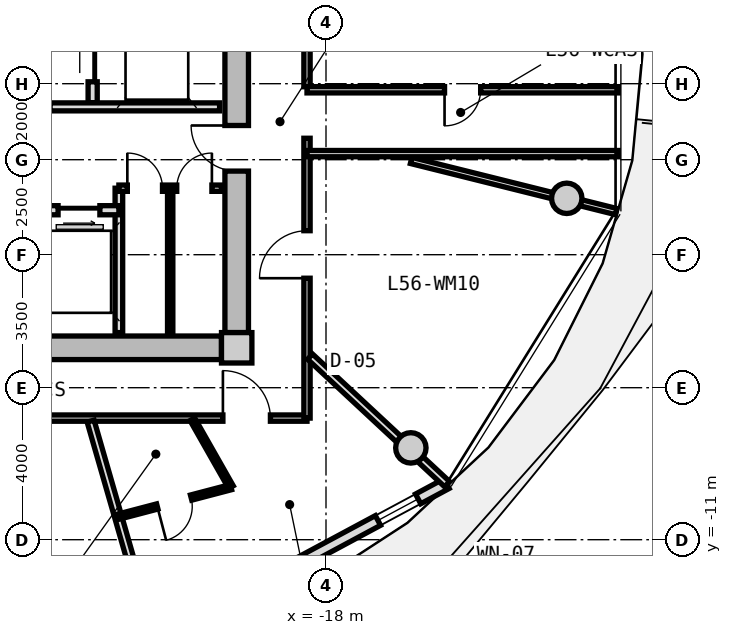
"""IFC4 building model, lengths in metres.
Left out: names, types, materials, properties, quantities, classifications, styles, units other than length and angle.
Written with IfcOpenShell. Run it as: python <this file> out.ifc"""

import sys

from ifc_helpers import new_model, si_unit, direction, frame, frame_2d, origin, origin_2d, place, context, subcontext, project, spatial, rectangle, circle, extrude, source, transform, mapped, element, fill, save


model = new_model("IFC4")
c1 = context("Model", 3, precision=1e-05, world=origin(), true_north=direction((0.0, 1.0)))
c2 = subcontext(c1, "Body", "Model", "MODEL_VIEW")
j1 = project(units=[si_unit("LENGTHUNIT", "METRE"), si_unit("PLANEANGLEUNIT", "RADIAN")], contexts=[c1])
p1 = place(None, origin())
s1 = spatial("IfcSite", under=j1, at=p1, CompositionType="ELEMENT")
p2 = place(p1, origin())
s2 = spatial("IfcBuilding", under=s1, at=p2, CompositionType="ELEMENT")
p3 = place(p2, frame((0.0, 0.0, 180.05)))
s3 = spatial("IfcBuildingStorey", under=s2, at=p3, CompositionType="ELEMENT", Elevation=180.05)
m1 = source(origin(), c2, "Body", "SweptSolid", [
    extrude(rectangle(XDim=0.8, YDim=0.8, at=origin_2d()), origin(), (0.0, 0.0, 1.0), 3.05),
])
p4 = place(p3, frame((-20.35, -5.95, 0.0), z_axis=(0.0, 0.0, 1.0), x_axis=(1.0, 0.0, 0.0)))
e1 = element("IfcColumn", 1, at=p4, inside=s3, PredefinedType="COLUMN", context=c2, shape_type="MappedRepresentation", body=[
    mapped(m1, transform((0.0, 0.0, 0.0), x_axis=(1.0, 0.0, 0.0), y_axis=(0.0, 1.0, 0.0), z_axis=(0.0, 0.0, 1.0), scale=1.0)),
])
m2 = source(origin(), c2, "Body", "SweptSolid", [
    extrude(rectangle(XDim=14.5, YDim=0.62, at=frame_2d((7.25, 0.0))), origin(), (0.0, 0.0, 1.0), 2.81),
])
p5 = place(p3, frame((-20.75, -5.95, 0.0), z_axis=(0.0, 0.0, 1.0), x_axis=(-1.0, 0.0, 0.0)))
e2 = element("IfcWall", 2, at=p5, inside=s3, PredefinedType="SHEAR", context=c2, shape_type="MappedRepresentation", body=[
    mapped(m2, transform((0.0, 0.0, 0.0), x_axis=(1.0, 0.0, 0.0), y_axis=(0.0, 1.0, 0.0), z_axis=(0.0, 0.0, 1.0), scale=1.0)),
])
m3 = source(origin(), c2, "Body", "SweptSolid", [
    extrude(rectangle(XDim=11.1, YDim=0.62, at=frame_2d((5.55, 0.0))), origin(), (0.0, 0.0, 1.0), 2.81),
])
p6 = place(p3, frame((-20.35, 5.55, 0.0), z_axis=(0.0, 0.0, 1.0), x_axis=(0.0, -1.0, 0.0)))
e3 = element("IfcWall", 3, at=p6, inside=s3, PredefinedType="SHEAR", context=c2, shape_type="MappedRepresentation", body=[
    mapped(m3, transform((0.0, 0.0, 0.0), x_axis=(1.0, 0.0, 0.0), y_axis=(0.0, 1.0, 0.0), z_axis=(0.0, 0.0, 1.0), scale=1.0)),
])
p7 = place(p6, frame((5.65, 0.0, 0.0)))
e4 = element("IfcOpeningElement", 4, at=p7, cuts=e3, PredefinedType="OPENING", context=c2, shape_type="SweptSolid", body=[
    extrude(rectangle(XDim=1.2, YDim=2.15, at=frame_2d((0.6, 1.075))), frame((0.0, 0.32, 0.0), z_axis=(0.0, -1.0, 0.0), x_axis=(1.0, 0.0, 0.0)), (0.0, 0.0, 1.0), 0.64),
])
m4 = source(origin(), c2, "Body", "SweptSolid", [
    extrude(circle(Radius=0.4, at=origin_2d()), origin(), (0.0, 0.0, 1.0), 3.05),
])
for number, where, z_axis, x_axis in (
    (5, (-15.767, -8.584, 0.0), (0.0, 0.0, 1.0), (1.0, 0.0, 0.0)),
    (6, (-11.665, -2.016, 0.0), (0.0, 0.0, 1.0), (1.0, 0.0, 0.0)),
):
    element("IfcColumn", number, at=place(p3, frame(where, z_axis=z_axis, x_axis=x_axis)), inside=s3, PredefinedType="COLUMN", context=c2, shape_type="MappedRepresentation", body=[
        mapped(m4, transform((0.0, 0.0, 0.0), x_axis=(1.0, 0.0, 0.0), y_axis=(0.0, 1.0, 0.0), z_axis=(0.0, 0.0, 1.0), scale=1.0)),
    ])
m5 = source(origin(), c2, "Body", "SweptSolid", [
    extrude(rectangle(XDim=8.742, YDim=0.29, at=frame_2d((4.371, 0.0))), origin(), (0.0, 0.0, 1.0), 2.81),
])
p8 = place(p3, frame((-14.827, -9.524, 0.0), z_axis=(0.0, 0.0, 1.0), x_axis=(-0.880998740657, -0.473118609823, 0.0)))
e7 = element("IfcWall", 7, at=p8, inside=s3, PredefinedType="SOLIDWALL", context=c2, shape_type="MappedRepresentation", body=[
    mapped(m5, transform((0.0, 0.0, 0.0), x_axis=(1.0, 0.0, 0.0), y_axis=(0.0, 1.0, 0.0), z_axis=(0.0, 0.0, 1.0), scale=1.0)),
])
p9 = place(p8, frame((6.66, 0.0, 0.0)))
e8 = element("IfcOpeningElement", 8, at=p9, cuts=e7, PredefinedType="OPENING", context=c2, shape_type="SweptSolid", body=[
    extrude(rectangle(XDim=1.15, YDim=2.25, at=frame_2d((0.575, 1.125))), frame((0.0, 0.155, 0.0), z_axis=(0.0, -1.0, 0.0), x_axis=(1.0, 0.0, 0.0)), (0.0, 0.0, 1.0), 0.31),
])
p10 = place(p8, frame((0.85, 0.0, 0.85)))
e9 = element("IfcOpeningElement", 9, at=p10, cuts=e7, PredefinedType="OPENING", context=c2, shape_type="SweptSolid", body=[
    extrude(rectangle(XDim=1.2, YDim=1.5, at=frame_2d((0.6, 0.75))), frame((0.0, 0.155, 0.0), z_axis=(0.0, -1.0, 0.0), x_axis=(1.0, 0.0, 0.0)), (0.0, 0.0, 1.0), 0.31),
])
m6 = source(origin(), c2, "Body", "SweptSolid", [
    extrude(rectangle(XDim=5.0, YDim=0.24, at=frame_2d((2.5, 0.0))), origin(), (0.0, 0.0, 1.0), 2.795),
])
p11 = place(p3, frame((-24.14, 0.5, 0.0), z_axis=(0.0, 0.0, 1.0), x_axis=(0.0, 1.0, 0.0)))
e10 = element("IfcWall", 10, at=p11, inside=s3, PredefinedType="PARTITIONING", context=c2, shape_type="MappedRepresentation", body=[
    mapped(m6, transform((0.0, 0.0, 0.0), x_axis=(1.0, 0.0, 0.0), y_axis=(0.0, 1.0, 0.0), z_axis=(0.0, 0.0, 1.0), scale=1.0)),
])
p12 = place(p11, frame((3.05, 0.0, 0.0)))
e11 = element("IfcOpeningElement", 11, at=p12, cuts=e10, PredefinedType="OPENING", context=c2, shape_type="SweptSolid", body=[
    extrude(rectangle(XDim=1.3, YDim=2.2, at=frame_2d((0.65, 1.1))), frame((0.0, 0.13, 0.0), z_axis=(0.0, -1.0, 0.0), x_axis=(1.0, 0.0, 0.0)), (0.0, 0.0, 1.0), 0.26),
])
p13 = place(p11, frame((0.55, 0.0, 0.0)))
e12 = element("IfcOpeningElement", 12, at=p13, cuts=e10, PredefinedType="OPENING", context=c2, shape_type="SweptSolid", body=[
    extrude(rectangle(XDim=1.3, YDim=2.2, at=frame_2d((0.65, 1.1))), frame((0.0, 0.13, 0.0), z_axis=(0.0, -1.0, 0.0), x_axis=(1.0, 0.0, 0.0)), (0.0, 0.0, 1.0), 0.26),
])
m7 = source(origin(), c2, "Body", "SweptSolid", [
    extrude(rectangle(XDim=6.66, YDim=0.21, at=frame_2d((3.33, 0.0))), origin(), (0.0, 0.0, 1.0), 2.795),
])
p14 = place(p3, frame((-27.46, 0.39, 0.0), z_axis=(0.0, 0.0, 1.0), x_axis=(1.0, 0.0, 0.0)))
e13 = element("IfcWall", 13, at=p14, inside=s3, PredefinedType="PARTITIONING", context=c2, shape_type="MappedRepresentation", body=[
    mapped(m7, transform((0.0, 0.0, 0.0), x_axis=(1.0, 0.0, 0.0), y_axis=(0.0, 1.0, 0.0), z_axis=(0.0, 0.0, 1.0), scale=1.0)),
])
p15 = place(p14, frame((1.0, 0.0, 0.0)))
e14 = element("IfcOpeningElement", 14, at=p15, cuts=e13, PredefinedType="OPENING", context=c2, shape_type="SweptSolid", body=[
    extrude(rectangle(XDim=1.2, YDim=2.15, at=frame_2d((0.6, 1.075))), frame((0.0, 0.115, 0.0), z_axis=(0.0, -1.0, 0.0), x_axis=(1.0, 0.0, 0.0)), (0.0, 0.0, 1.0), 0.23),
])
m8 = source(origin(), c2, "Body", "SweptSolid", [
    extrude(rectangle(XDim=3.8, YDim=0.2, at=frame_2d((1.9, 0.0))), origin(), (0.0, 0.0, 1.0), 2.795),
])
p16 = place(p3, frame((-23.45, -5.55, 0.0), z_axis=(0.0, 0.0, 1.0), x_axis=(0.0, 1.0, 0.0)))
e15 = element("IfcWall", 15, at=p16, inside=s3, PredefinedType="PARTITIONING", context=c2, shape_type="MappedRepresentation", body=[
    mapped(m8, transform((0.0, 0.0, 0.0), x_axis=(1.0, 0.0, 0.0), y_axis=(0.0, 1.0, 0.0), z_axis=(0.0, 0.0, 1.0), scale=1.0)),
])
m9 = source(origin(), c2, "Body", "SweptSolid", [
    extrude(rectangle(XDim=2.05, YDim=0.24, at=frame_2d((1.025, 0.0))), origin(), (0.0, 0.0, 1.0), 2.795),
])
p17 = place(p3, frame((-25.5, -2.33, 0.0), z_axis=(0.0, 0.0, 1.0), x_axis=(1.0, 0.0, 0.0)))
e16 = element("IfcWall", 16, at=p17, inside=s3, PredefinedType="PARTITIONING", context=c2, shape_type="MappedRepresentation", body=[
    mapped(m9, transform((0.0, 0.0, 0.0), x_axis=(1.0, 0.0, 0.0), y_axis=(0.0, 1.0, 0.0), z_axis=(0.0, 0.0, 1.0), scale=1.0)),
])
p18 = place(p17, frame((0.45, 0.0, 0.0)))
e17 = element("IfcOpeningElement", 17, at=p18, cuts=e16, PredefinedType="OPENING", context=c2, shape_type="SweptSolid", body=[
    extrude(rectangle(XDim=1.1, YDim=2.2, at=frame_2d((0.55, 1.1))), frame((0.0, 0.13, 0.0), z_axis=(0.0, -1.0, 0.0), x_axis=(1.0, 0.0, 0.0)), (0.0, 0.0, 1.0), 0.26),
])
m10 = source(origin(), c2, "Body", "SweptSolid", [
    extrude(rectangle(XDim=2.7, YDim=0.165, at=frame_2d((1.35, 0.0))), origin(), (0.0, 0.0, 1.0), 2.795),
])
p19 = place(p3, frame((-23.45, -1.75, 0.0), z_axis=(0.0, 0.0, 1.0), x_axis=(1.0, 0.0, 0.0)))
e18 = element("IfcWall", 18, at=p19, inside=s3, PredefinedType="PARTITIONING", context=c2, shape_type="MappedRepresentation", body=[
    mapped(m10, transform((0.0, 0.0, 0.0), x_axis=(1.0, 0.0, 0.0), y_axis=(0.0, 1.0, 0.0), z_axis=(0.0, 0.0, 1.0), scale=1.0)),
])
p20 = place(p19, frame((0.222, 0.0, 0.0)))
e19 = element("IfcOpeningElement", 19, at=p20, cuts=e18, PredefinedType="OPENING", context=c2, shape_type="SweptSolid", body=[
    extrude(rectangle(XDim=0.925, YDim=2.1, at=frame_2d((0.462, 1.05))), frame((0.0, 0.093, 0.0), z_axis=(0.0, -1.0, 0.0), x_axis=(1.0, 0.0, 0.0)), (0.0, 0.0, 1.0), 0.185),
])
p21 = place(p19, frame((1.522, 0.0, 0.0)))
e20 = element("IfcOpeningElement", 20, at=p21, cuts=e18, PredefinedType="OPENING", context=c2, shape_type="SweptSolid", body=[
    extrude(rectangle(XDim=0.925, YDim=2.1, at=frame_2d((0.462, 1.05))), frame((0.0, 0.093, 0.0), z_axis=(0.0, -1.0, 0.0), x_axis=(1.0, 0.0, 0.0)), (0.0, 0.0, 1.0), 0.185),
])
m11 = source(origin(), c2, "Body", "SweptSolid", [
    extrude(rectangle(XDim=3.8, YDim=0.14, at=frame_2d((1.9, 0.0))), origin(), (0.0, 0.0, 1.0), 2.795),
])
p22 = place(p3, frame((-22.1, -5.55, 0.0), z_axis=(0.0, 0.0, 1.0), x_axis=(0.0, 1.0, 0.0)))
e21 = element("IfcWall", 21, at=p22, inside=s3, PredefinedType="PARTITIONING", context=c2, shape_type="MappedRepresentation", body=[
    mapped(m11, transform((0.0, 0.0, 0.0), x_axis=(1.0, 0.0, 0.0), y_axis=(0.0, 1.0, 0.0), z_axis=(0.0, 0.0, 1.0), scale=1.0)),
])
m12 = source(origin(), c2, "Body", "SweptSolid", [
    extrude(rectangle(XDim=19.0, YDim=0.165, at=frame_2d((9.5, 0.0))), origin(), (0.0, 0.0, 1.0), 2.795),
])
p23 = place(p3, frame((-18.5, -7.8, 0.0), z_axis=(0.0, 0.0, 1.0), x_axis=(-1.0, 0.0, 0.0)))
e22 = element("IfcWall", 22, at=p23, inside=s3, PredefinedType="PARTITIONING", context=c2, shape_type="MappedRepresentation", body=[
    mapped(m12, transform((0.0, 0.0, 0.0), x_axis=(1.0, 0.0, 0.0), y_axis=(0.0, 1.0, 0.0), z_axis=(0.0, 0.0, 1.0), scale=1.0)),
])
p24 = place(p23, frame((11.598, 0.0, 0.0)))
e23 = element("IfcOpeningElement", 23, at=p24, cuts=e22, PredefinedType="OPENING", context=c2, shape_type="SweptSolid", body=[
    extrude(rectangle(XDim=1.25, YDim=2.2, at=frame_2d((0.625, 1.1))), frame((0.0, 0.093, 0.0), z_axis=(0.0, -1.0, 0.0), x_axis=(1.0, 0.0, 0.0)), (0.0, 0.0, 1.0), 0.185),
])
p25 = place(p23, frame((0.963, 0.0, 0.0)))
e24 = element("IfcOpeningElement", 24, at=p25, cuts=e22, PredefinedType="OPENING", context=c2, shape_type="SweptSolid", body=[
    extrude(rectangle(XDim=1.25, YDim=2.2, at=frame_2d((0.625, 1.1))), frame((0.0, 0.093, 0.0), z_axis=(0.0, -1.0, 0.0), x_axis=(1.0, 0.0, 0.0)), (0.0, 0.0, 1.0), 0.185),
])
m13 = source(origin(), c2, "Body", "SweptSolid", [
    extrude(rectangle(XDim=6.88, YDim=0.165, at=frame_2d((3.44, 0.0))), origin(), (0.0, 0.0, 1.0), 2.795),
])
p26 = place(p3, frame((-18.5, 7.8, 0.0), z_axis=(0.0, 0.0, 1.0), x_axis=(0.0, -1.0, 0.0)))
e25 = element("IfcWall", 25, at=p26, inside=s3, PredefinedType="PARTITIONING", context=c2, shape_type="MappedRepresentation", body=[
    mapped(m13, transform((0.0, 0.0, 0.0), x_axis=(1.0, 0.0, 0.0), y_axis=(0.0, 1.0, 0.0), z_axis=(0.0, 0.0, 1.0), scale=1.0)),
])
p27 = place(p26, frame((2.081, 0.0, 0.0)))
e26 = element("IfcOpeningElement", 26, at=p27, cuts=e25, PredefinedType="OPENING", context=c2, shape_type="SweptSolid", body=[
    extrude(rectangle(XDim=1.05, YDim=2.15, at=frame_2d((0.525, 1.075))), frame((0.0, 0.093, 0.0), z_axis=(0.0, -1.0, 0.0), x_axis=(1.0, 0.0, 0.0)), (0.0, 0.0, 1.0), 0.185),
])
m14 = source(origin(), c2, "Body", "SweptSolid", [
    extrude(rectangle(XDim=7.365, YDim=0.165, at=frame_2d((3.682, 0.0))), origin(), (0.0, 0.0, 1.0), 2.795),
])
p28 = place(p3, frame((-18.5, -0.436, 0.0), z_axis=(0.0, 0.0, 1.0), x_axis=(0.0, -1.0, 0.0)))
e27 = element("IfcWall", 27, at=p28, inside=s3, PredefinedType="PARTITIONING", context=c2, shape_type="MappedRepresentation", body=[
    mapped(m14, transform((0.0, 0.0, 0.0), x_axis=(1.0, 0.0, 0.0), y_axis=(0.0, 1.0, 0.0), z_axis=(0.0, 0.0, 1.0), scale=1.0)),
])
p29 = place(p28, frame((2.433, 0.0, 0.0)))
e28 = element("IfcOpeningElement", 28, at=p29, cuts=e27, PredefinedType="OPENING", context=c2, shape_type="SweptSolid", body=[
    extrude(rectangle(XDim=1.25, YDim=2.2, at=frame_2d((0.625, 1.1))), frame((0.0, 0.093, 0.0), z_axis=(0.0, -1.0, 0.0), x_axis=(1.0, 0.0, 0.0)), (0.0, 0.0, 1.0), 0.185),
])
m15 = source(origin(), c2, "Body", "SweptSolid", [
    extrude(rectangle(XDim=5.564, YDim=0.165, at=frame_2d((2.782, 0.0))), origin(), (0.0, 0.0, 1.0), 2.345),
])
p30 = place(p3, frame((-15.76, -1.02, 0.0), z_axis=(0.0, 0.0, 1.0), x_axis=(0.970315176167, -0.241843872984, 0.0)))
e29 = element("IfcWall", 29, at=p30, inside=s3, PredefinedType="PARTITIONING", context=c2, shape_type="MappedRepresentation", body=[
    mapped(m15, transform((0.0, 0.0, 0.0), x_axis=(1.0, 0.0, 0.0), y_axis=(0.0, 1.0, 0.0), z_axis=(0.0, 0.0, 1.0), scale=1.0)),
])
m16 = source(origin(), c2, "Body", "SweptSolid", [
    extrude(rectangle(XDim=8.189, YDim=0.165, at=frame_2d((4.094, 0.0))), origin(), (0.0, 0.0, 1.0), 2.795),
])
p31 = place(p3, frame((-18.5, 0.84, 0.0), z_axis=(0.0, 0.0, 1.0), x_axis=(1.0, 0.0, 0.0)))
e30 = element("IfcWall", 30, at=p31, inside=s3, PredefinedType="PARTITIONING", context=c2, shape_type="MappedRepresentation", body=[
    mapped(m16, transform((0.0, 0.0, 0.0), x_axis=(1.0, 0.0, 0.0), y_axis=(0.0, 1.0, 0.0), z_axis=(0.0, 0.0, 1.0), scale=1.0)),
])
p32 = place(p31, frame((3.619, 0.0, 0.0)))
e31 = element("IfcOpeningElement", 31, at=p32, cuts=e30, PredefinedType="OPENING", context=c2, shape_type="SweptSolid", body=[
    extrude(rectangle(XDim=0.95, YDim=2.1, at=frame_2d((0.475, 1.05))), frame((0.0, 0.093, 0.0), z_axis=(0.0, -1.0, 0.0), x_axis=(1.0, 0.0, 0.0)), (0.0, 0.0, 1.0), 0.185),
])
p33 = place(p3, frame((-10.311, -0.84, 0.0), z_axis=(0.0, 0.0, 1.0), x_axis=(-1.0, 0.0, 0.0)))
e32 = element("IfcWall", 32, at=p33, inside=s3, PredefinedType="PARTITIONING", context=c2, shape_type="MappedRepresentation", body=[
    mapped(m16, transform((0.0, 0.0, 0.0), x_axis=(1.0, 0.0, 0.0), y_axis=(0.0, 1.0, 0.0), z_axis=(0.0, 0.0, 1.0), scale=1.0)),
])
m17 = source(origin(), c2, "Body", "SweptSolid", [
    extrude(rectangle(XDim=6.035, YDim=0.19, at=frame_2d((3.018, 0.0))), origin(), (0.0, 0.0, 1.0), 2.345),
])
p34 = place(p3, frame((-24.194, -7.88, 0.0), z_axis=(0.0, 0.0, 1.0), x_axis=(0.276809454862, -0.960924828329, 0.0)))
e33 = element("IfcWall", 33, at=p34, inside=s3, PredefinedType="PARTITIONING", context=c2, shape_type="MappedRepresentation", body=[
    mapped(m17, transform((0.0, 0.0, 0.0), x_axis=(1.0, 0.0, 0.0), y_axis=(0.0, 1.0, 0.0), z_axis=(0.0, 0.0, 1.0), scale=1.0)),
])
m18 = source(origin(), c2, "Body", "SweptSolid", [
    extrude(rectangle(XDim=4.927, YDim=0.19, at=frame_2d((2.463, 0.0))), origin(), (0.0, 0.0, 1.0), 2.435),
])
p35 = place(p3, frame((-18.42, -6.183, 0.0), z_axis=(0.0, 0.0, 1.0), x_axis=(0.732191335987, -0.681098999783, 0.0)))
e34 = element("IfcWall", 34, at=p35, inside=s3, PredefinedType="PARTITIONING", context=c2, shape_type="MappedRepresentation", body=[
    mapped(m18, transform((0.0, 0.0, 0.0), x_axis=(1.0, 0.0, 0.0), y_axis=(0.0, 1.0, 0.0), z_axis=(0.0, 0.0, 1.0), scale=1.0)),
])
m19 = source(origin(), c2, "Body", "SweptSolid", [
    extrude(rectangle(XDim=2.055, YDim=0.14, at=frame_2d((1.027, 0.0))), origin(), (0.0, 0.0, 1.0), 2.795),
])
p36 = place(p3, frame((-21.516, -7.83, 0.0), z_axis=(0.0, 0.0, 1.0), x_axis=(0.494154336367, -0.869374195528, 0.0)))
e35 = element("IfcWall", 35, at=p36, inside=s3, PredefinedType="PARTITIONING", context=c2, shape_type="MappedRepresentation", body=[
    mapped(m19, transform((0.0, 0.0, 0.0), x_axis=(1.0, 0.0, 0.0), y_axis=(0.0, 1.0, 0.0), z_axis=(0.0, 0.0, 1.0), scale=1.0)),
])
m20 = source(origin(), c2, "Body", "SweptSolid", [
    extrude(rectangle(XDim=3.088, YDim=0.14, at=frame_2d((1.544, 0.0))), origin(), (0.0, 0.0, 1.0), 2.795),
])
p37 = place(p3, frame((-20.501, -9.616, 0.0), z_axis=(0.0, 0.0, 1.0), x_axis=(-0.967224898254, -0.253921240146, 0.0)))
e36 = element("IfcWall", 36, at=p37, inside=s3, PredefinedType="PARTITIONING", context=c2, shape_type="MappedRepresentation", body=[
    mapped(m20, transform((0.0, 0.0, 0.0), x_axis=(1.0, 0.0, 0.0), y_axis=(0.0, 1.0, 0.0), z_axis=(0.0, 0.0, 1.0), scale=1.0)),
])
p38 = place(p37, frame((1.084, 0.0, 0.0)))
e37 = element("IfcOpeningElement", 37, at=p38, cuts=e36, PredefinedType="OPENING", context=c2, shape_type="SweptSolid", body=[
    extrude(rectangle(XDim=0.92, YDim=2.1, at=frame_2d((0.46, 1.05))), frame((0.0, 0.08, 0.0), z_axis=(0.0, -1.0, 0.0), x_axis=(1.0, 0.0, 0.0)), (0.0, 0.0, 1.0), 0.16),
])
m21 = source(origin(), c2, "Body", "SweptSolid", [
    extrude(rectangle(XDim=1.2, YDim=1.5, at=frame_2d((0.6, 0.75))), frame((0.0, 0.03, 0.0), z_axis=(0.0, -1.0, 0.0), x_axis=(1.0, 0.0, 0.0)), (0.0, 0.0, 1.0), 0.06),
])
p39 = place(p10, origin())
e38 = element("IfcWindow", 38, at=p39, inside=s3, PartitioningType="SINGLE_PANEL", PredefinedType="WINDOW", context=c2, shape_type="MappedRepresentation", body=[
    mapped(m21, transform((0.0, 0.0, 0.0), x_axis=(1.0, 0.0, 0.0), y_axis=(0.0, 1.0, 0.0), z_axis=(0.0, 0.0, 1.0), scale=1.0)),
])
fill(e9, e38)
m22 = source(origin(), c2, "Body", "SweptSolid", [
    extrude(rectangle(XDim=1.3, YDim=2.2, at=frame_2d((0.65, 1.1))), frame((0.0, 0.025, 0.0), z_axis=(0.0, -1.0, 0.0), x_axis=(1.0, 0.0, 0.0)), (0.0, 0.0, 1.0), 0.05),
])
p40 = place(p13, origin())
e39 = element("IfcDoor", 39, at=p40, inside=s3, OperationType="SLIDING_TO_RIGHT", PredefinedType="DOOR", context=c2, shape_type="MappedRepresentation", body=[
    mapped(m22, transform((0.0, 0.0, 0.0), x_axis=(1.0, 0.0, 0.0), y_axis=(0.0, 1.0, 0.0), z_axis=(0.0, 0.0, 1.0), scale=1.0)),
])
fill(e12, e39)
m23 = source(origin(), c2, "Body", "SweptSolid", [
    extrude(rectangle(XDim=1.2, YDim=2.15, at=frame_2d((0.6, 1.075))), frame((0.0, 0.025, 0.0), z_axis=(0.0, -1.0, 0.0), x_axis=(1.0, 0.0, 0.0)), (0.0, 0.0, 1.0), 0.05),
])
p41 = place(p7, frame((1.2, 0.0, 0.0), z_axis=(0.0, 0.0, 1.0), x_axis=(-1.0, 0.0, 0.0)))
e40 = element("IfcDoor", 40, at=p41, inside=s3, OperationType="SINGLE_SWING_RIGHT", PredefinedType="DOOR", context=c2, shape_type="MappedRepresentation", body=[
    mapped(m23, transform((0.0, 0.0, 0.0), x_axis=(1.0, 0.0, 0.0), y_axis=(0.0, 1.0, 0.0), z_axis=(0.0, 0.0, 1.0), scale=1.0)),
])
fill(e4, e40)
m24 = source(origin(), c2, "Body", "SweptSolid", [
    extrude(rectangle(XDim=1.1, YDim=2.2, at=frame_2d((0.55, 1.1))), frame((0.0, 0.025, 0.0), z_axis=(0.0, -1.0, 0.0), x_axis=(1.0, 0.0, 0.0)), (0.0, 0.0, 1.0), 0.05),
])
p42 = place(p18, frame((1.1, 0.0, 0.0), z_axis=(0.0, 0.0, 1.0), x_axis=(-1.0, 0.0, 0.0)))
e41 = element("IfcDoor", 41, at=p42, inside=s3, OperationType="SLIDING_TO_RIGHT", PredefinedType="DOOR", context=c2, shape_type="MappedRepresentation", body=[
    mapped(m24, transform((0.0, 0.0, 0.0), x_axis=(1.0, 0.0, 0.0), y_axis=(0.0, 1.0, 0.0), z_axis=(0.0, 0.0, 1.0), scale=1.0)),
])
fill(e17, e41)
m25 = source(origin(), c2, "Body", "SweptSolid", [
    extrude(rectangle(XDim=0.925, YDim=2.1, at=frame_2d((0.462, 1.05))), frame((0.0, 0.025, 0.0), z_axis=(0.0, -1.0, 0.0), x_axis=(1.0, 0.0, 0.0)), (0.0, 0.0, 1.0), 0.05),
])
p43 = place(p20, origin())
e42 = element("IfcDoor", 42, at=p43, inside=s3, OperationType="SINGLE_SWING_LEFT", PredefinedType="DOOR", context=c2, shape_type="MappedRepresentation", body=[
    mapped(m25, transform((0.0, 0.0, 0.0), x_axis=(1.0, 0.0, 0.0), y_axis=(0.0, 1.0, 0.0), z_axis=(0.0, 0.0, 1.0), scale=1.0)),
])
fill(e19, e42)
p44 = place(p21, origin())
e43 = element("IfcDoor", 43, at=p44, inside=s3, OperationType="SINGLE_SWING_RIGHT", PredefinedType="DOOR", context=c2, shape_type="MappedRepresentation", body=[
    mapped(m25, transform((0.0, 0.0, 0.0), x_axis=(1.0, 0.0, 0.0), y_axis=(0.0, 1.0, 0.0), z_axis=(0.0, 0.0, 1.0), scale=1.0)),
])
fill(e20, e43)
m26 = source(origin(), c2, "Body", "SweptSolid", [
    extrude(rectangle(XDim=0.95, YDim=2.1, at=frame_2d((0.475, 1.05))), frame((0.0, 0.025, 0.0), z_axis=(0.0, -1.0, 0.0), x_axis=(1.0, 0.0, 0.0)), (0.0, 0.0, 1.0), 0.05),
])
p45 = place(p32, frame((0.95, 0.0, 0.0), z_axis=(0.0, 0.0, 1.0), x_axis=(-1.0, 0.0, 0.0)))
e44 = element("IfcDoor", 44, at=p45, inside=s3, OperationType="SINGLE_SWING_RIGHT", PredefinedType="DOOR", context=c2, shape_type="MappedRepresentation", body=[
    mapped(m26, transform((0.0, 0.0, 0.0), x_axis=(1.0, 0.0, 0.0), y_axis=(0.0, 1.0, 0.0), z_axis=(0.0, 0.0, 1.0), scale=1.0)),
])
fill(e31, e44)
m27 = source(origin(), c2, "Body", "SweptSolid", [
    extrude(rectangle(XDim=1.25, YDim=2.2, at=frame_2d((0.625, 1.1))), frame((0.0, 0.025, 0.0), z_axis=(0.0, -1.0, 0.0), x_axis=(1.0, 0.0, 0.0)), (0.0, 0.0, 1.0), 0.05),
])
p46 = place(p25, frame((1.25, 0.0, 0.0), z_axis=(0.0, 0.0, 1.0), x_axis=(-1.0, 0.0, 0.0)))
e45 = element("IfcDoor", 45, at=p46, inside=s3, OperationType="SINGLE_SWING_LEFT", PredefinedType="DOOR", context=c2, shape_type="MappedRepresentation", body=[
    mapped(m27, transform((0.0, 0.0, 0.0), x_axis=(1.0, 0.0, 0.0), y_axis=(0.0, 1.0, 0.0), z_axis=(0.0, 0.0, 1.0), scale=1.0)),
])
fill(e24, e45)
m28 = source(origin(), c2, "Body", "SweptSolid", [
    extrude(rectangle(XDim=0.92, YDim=2.1, at=frame_2d((0.46, 1.05))), frame((0.0, 0.025, 0.0), z_axis=(0.0, -1.0, 0.0), x_axis=(1.0, 0.0, 0.0)), (0.0, 0.0, 1.0), 0.05),
])
p47 = place(p38, origin())
e46 = element("IfcDoor", 46, at=p47, inside=s3, OperationType="SINGLE_SWING_RIGHT", PredefinedType="DOOR", context=c2, shape_type="MappedRepresentation", body=[
    mapped(m28, transform((0.0, 0.0, 0.0), x_axis=(1.0, 0.0, 0.0), y_axis=(0.0, 1.0, 0.0), z_axis=(0.0, 0.0, 1.0), scale=1.0)),
])
fill(e37, e46)
p48 = place(p29, frame((1.25, 0.0, 0.0), z_axis=(0.0, 0.0, 1.0), x_axis=(-1.0, 0.0, 0.0)))
e47 = element("IfcDoor", 47, at=p48, inside=s3, OperationType="SINGLE_SWING_LEFT", PredefinedType="DOOR", context=c2, shape_type="MappedRepresentation", body=[
    mapped(m27, transform((0.0, 0.0, 0.0), x_axis=(1.0, 0.0, 0.0), y_axis=(0.0, 1.0, 0.0), z_axis=(0.0, 0.0, 1.0), scale=1.0)),
])
fill(e28, e47)
save(model, sys.argv[1])
